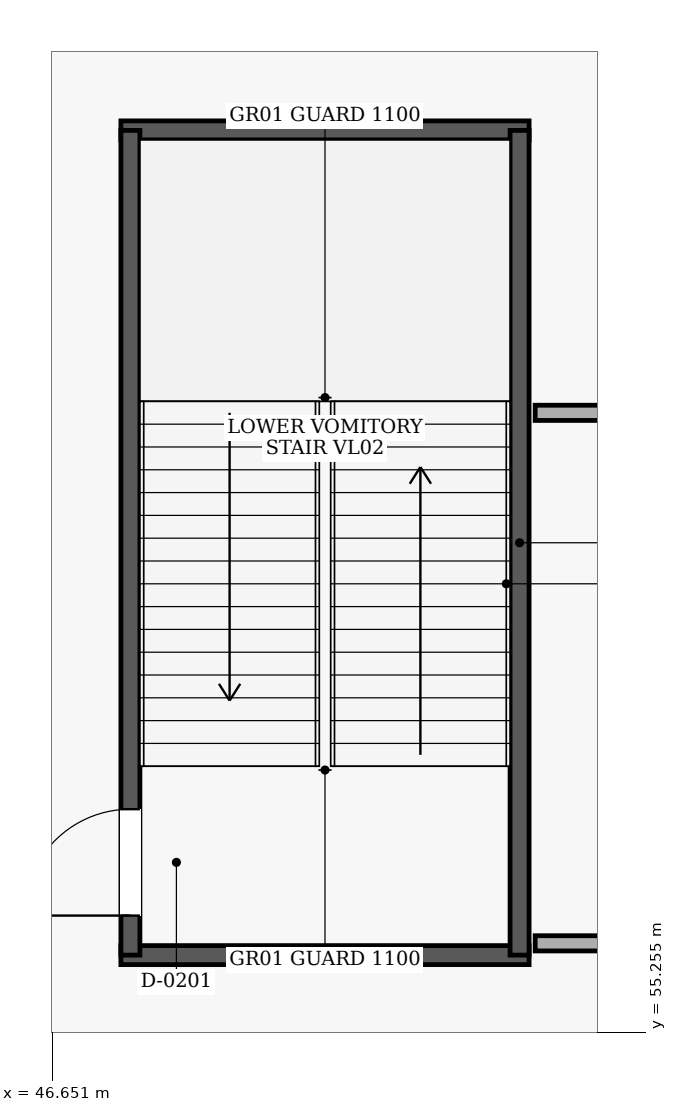
"""IFC4 building model, lengths in metres.
Left out: names, types, materials, properties, quantities, classifications, styles, units other than length and angle.
Written with IfcOpenShell. Run it as: python <this file> out.ifc"""

import sys

from ifc_helpers import new_model, si_unit, direction, frame, frame_2d, origin, place, context, subcontext, project, spatial, rectangle, extrude, element, fill, save


model = new_model("IFC4")
c1 = context("Model", 3, precision=1e-05, world=origin(), true_north=direction((0.0, 1.0)))
c2 = subcontext(c1, "Body", "Model", "MODEL_VIEW")
j1 = project(units=[si_unit("LENGTHUNIT", "METRE"), si_unit("PLANEANGLEUNIT", "RADIAN")], contexts=[c1])
p1 = place(None, origin())
s1 = spatial("IfcSite", under=j1, at=p1, CompositionType="ELEMENT")
p2 = place(p1, origin())
s2 = spatial("IfcBuilding", under=s1, at=p2, CompositionType="ELEMENT")
p3 = place(p2, origin())
s3 = spatial("IfcBuildingStorey", under=s2, at=p3, CompositionType="ELEMENT", Elevation=0.0)
for number, where, z_axis, x_axis in (
    (1, (47.55, 56.275, 0.0), (0.0, 0.0, 1.0), (1.0, 0.0, 0.0)),
    (2, (52.92, 67.125, 0.0), (0.0, 0.0, 1.0), (-1.0, 0.0, 0.0)),
):
    element("IfcWall", number, at=place(p3, frame(where, z_axis=z_axis, x_axis=x_axis)), inside=s3, PredefinedType="SHEAR", context=c2, shape_type="SweptSolid", body=[
        extrude(rectangle(XDim=5.37, YDim=0.25, at=frame_2d((2.685, 0.0))), origin(), (0.0, 0.0, 1.0), 5.08),
    ])
p4 = place(p3, frame((47.675, 56.275, 0.0), z_axis=(0.0, 0.0, 1.0), x_axis=(0.0, 1.0, 0.0)))
e3 = element("IfcWall", 3, at=p4, inside=s3, PredefinedType="SHEAR", context=c2, shape_type="SweptSolid", body=[
    extrude(rectangle(XDim=10.85, YDim=0.25, at=frame_2d((5.425, 0.0))), origin(), (0.0, 0.0, 1.0), 5.08),
])
p5 = place(p4, frame((0.52, 0.0, 0.0)))
e4 = element("IfcOpeningElement", 4, at=p5, cuts=e3, PredefinedType="OPENING", context=c2, shape_type="SweptSolid", body=[
    extrude(rectangle(XDim=1.4, YDim=2.15, at=frame_2d((0.7, 1.075))), frame((0.0, 0.135, 0.0), z_axis=(0.0, -1.0, 0.0), x_axis=(1.0, 0.0, 0.0)), (0.0, 0.0, 1.0), 0.27),
])
p6 = place(p3, frame((52.795, 56.275, 0.0), z_axis=(0.0, 0.0, 1.0), x_axis=(0.0, 1.0, 0.0)))
e5 = element("IfcWall", 5, at=p6, inside=s3, PredefinedType="SHEAR", context=c2, shape_type="SweptSolid", body=[
    extrude(rectangle(XDim=10.85, YDim=0.25, at=frame_2d((5.425, 0.0))), origin(), (0.0, 0.0, 1.0), 5.08),
])
p7 = place(p3, frame((53.0, 56.43, 0.0), z_axis=(0.0, 0.0, 1.0), x_axis=(1.0, 0.0, 0.0)))
e6 = element("IfcWall", 6, at=p7, inside=s3, PredefinedType="PARTITIONING", context=c2, shape_type="SweptSolid", body=[
    extrude(rectangle(XDim=15.4, YDim=0.2, at=frame_2d((7.7, 0.0))), origin(), (0.0, 0.0, 1.0), 5.08),
])
p8 = place(p7, frame((6.138, 0.0, 0.0)))
e7 = element("IfcOpeningElement", 7, at=p8, cuts=e6, PredefinedType="OPENING", context=c2, shape_type="SweptSolid", body=[
    extrude(rectangle(XDim=0.92, YDim=2.1, at=frame_2d((0.46, 1.05))), frame((0.0, 0.11, 0.0), z_axis=(0.0, -1.0, 0.0), x_axis=(1.0, 0.0, 0.0)), (0.0, 0.0, 1.0), 0.22),
])
p9 = place(p3, frame((68.4, 63.409, 0.0), z_axis=(0.0, 0.0, 1.0), x_axis=(-1.0, 0.0, 0.0)))
e8 = element("IfcWall", 8, at=p9, inside=s3, PredefinedType="PARTITIONING", context=c2, shape_type="SweptSolid", body=[
    extrude(rectangle(XDim=15.4, YDim=0.2, at=frame_2d((7.7, 0.0))), origin(), (0.0, 0.0, 1.0), 5.08),
])
p10 = place(p5, origin())
e9 = element("IfcDoor", 9, at=p10, inside=s3, OperationType="SINGLE_SWING_LEFT", PredefinedType="DOOR", context=c2, shape_type="SweptSolid", body=[
    extrude(rectangle(XDim=1.4, YDim=2.15, at=frame_2d((0.7, 1.075))), frame((0.0, 0.025, 0.0), z_axis=(0.0, -1.0, 0.0), x_axis=(1.0, 0.0, 0.0)), (0.0, 0.0, 1.0), 0.05),
])
fill(e4, e9)
save(model, sys.argv[1])
